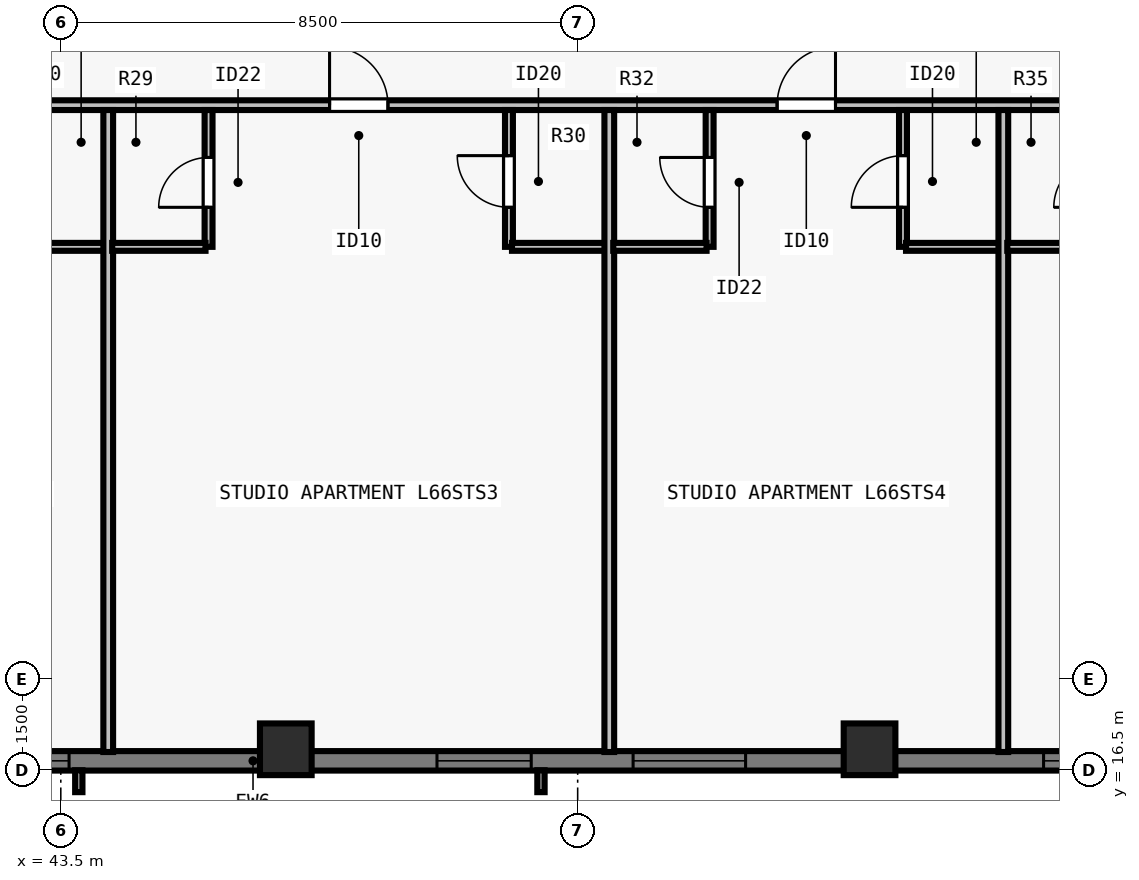
"""IFC4 building model, lengths in metres.
Left out: names, types, materials, properties, quantities, classifications, styles, units other than length and angle.
Written with IfcOpenShell. Run it as: python <this file> out.ifc"""

import sys

from ifc_helpers import new_model, si_unit, direction, frame, frame_2d, origin, origin_2d, place, context, subcontext, project, spatial, rectangle, extrude, element, fill, save


model = new_model("IFC4")
c1 = context("Model", 3, precision=1e-05, world=origin(), true_north=direction((0.0, 1.0)))
c2 = subcontext(c1, "Body", "Model", "MODEL_VIEW")
j1 = project(units=[si_unit("LENGTHUNIT", "METRE"), si_unit("PLANEANGLEUNIT", "RADIAN")], contexts=[c1])
p1 = place(None, origin())
s1 = spatial("IfcSite", under=j1, at=p1, CompositionType="ELEMENT")
p2 = place(p1, origin())
s2 = spatial("IfcBuilding", under=s1, at=p2, CompositionType="ELEMENT")
p3 = place(p2, frame((0.0, 0.0, 241.0)))
s3 = spatial("IfcBuildingStorey", under=s2, at=p3, CompositionType="ELEMENT", Elevation=241.0)
for number, where, z_axis, x_axis in (
    (1, (47.2, 16.85, 0.0), (0.0, 0.0, 1.0), (1.0, 0.0, 0.0)),
    (2, (56.8, 16.85, 0.0), (0.0, 0.0, 1.0), (1.0, 0.0, 0.0)),
):
    element("IfcColumn", number, at=place(p3, frame(where, z_axis=z_axis, x_axis=x_axis)), inside=s3, PredefinedType="COLUMN", context=c2, shape_type="SweptSolid", body=[
        extrude(rectangle(XDim=0.85, YDim=0.85, at=origin_2d()), origin(), (0.0, 0.0, 1.0), 3.5),
    ])
p4 = place(p3, frame((69.5, 16.66, 0.0), z_axis=(0.0, 0.0, 1.0), x_axis=(-1.0, 0.0, 0.0)))
e3 = element("IfcWall", 3, at=p4, inside=s3, PredefinedType="SOLIDWALL", context=c2, shape_type="SweptSolid", body=[
    extrude(rectangle(XDim=34.702, YDim=0.32, at=frame_2d((17.351, 0.0))), origin(), (0.0, 0.0, 1.0), 3.29),
])
p5 = place(p4, frame((4.763, 0.0, 0.8)))
e4 = element("IfcOpeningElement", 4, at=p5, cuts=e3, PredefinedType="OPENING", context=c2, shape_type="SweptSolid", body=[
    extrude(rectangle(XDim=1.55, YDim=1.678, at=frame_2d((0.775, 0.839))), frame((0.0, 0.17, 0.0), z_axis=(0.0, -1.0, 0.0), x_axis=(1.0, 0.0, 0.0)), (0.0, 0.0, 1.0), 0.34),
])
p6 = place(p4, frame((7.988, 0.0, 0.8)))
e5 = element("IfcOpeningElement", 5, at=p6, cuts=e3, PredefinedType="OPENING", context=c2, shape_type="SweptSolid", body=[
    extrude(rectangle(XDim=1.85, YDim=1.678, at=frame_2d((0.925, 0.839))), frame((0.0, 0.17, 0.0), z_axis=(0.0, -1.0, 0.0), x_axis=(1.0, 0.0, 0.0)), (0.0, 0.0, 1.0), 0.34),
])
p7 = place(p4, frame((14.738, 0.0, 0.8)))
e6 = element("IfcOpeningElement", 6, at=p7, cuts=e3, PredefinedType="OPENING", context=c2, shape_type="SweptSolid", body=[
    extrude(rectangle(XDim=1.85, YDim=1.678, at=frame_2d((0.925, 0.839))), frame((0.0, 0.17, 0.0), z_axis=(0.0, -1.0, 0.0), x_axis=(1.0, 0.0, 0.0)), (0.0, 0.0, 1.0), 0.34),
])
p8 = place(p4, frame((18.264, 0.0, 0.8)))
e7 = element("IfcOpeningElement", 7, at=p8, cuts=e3, PredefinedType="OPENING", context=c2, shape_type="SweptSolid", body=[
    extrude(rectangle(XDim=1.55, YDim=1.678, at=frame_2d((0.775, 0.839))), frame((0.0, 0.17, 0.0), z_axis=(0.0, -1.0, 0.0), x_axis=(1.0, 0.0, 0.0)), (0.0, 0.0, 1.0), 0.34),
])
p9 = place(p4, frame((25.864, 0.0, 0.8)))
e8 = element("IfcOpeningElement", 8, at=p9, cuts=e3, PredefinedType="OPENING", context=c2, shape_type="SweptSolid", body=[
    extrude(rectangle(XDim=1.55, YDim=1.678, at=frame_2d((0.775, 0.839))), frame((0.0, 0.17, 0.0), z_axis=(0.0, -1.0, 0.0), x_axis=(1.0, 0.0, 0.0)), (0.0, 0.0, 1.0), 0.34),
])
p10 = place(p4, frame((28.24, 0.0, 0.8)))
e9 = element("IfcOpeningElement", 9, at=p10, cuts=e3, PredefinedType="OPENING", context=c2, shape_type="SweptSolid", body=[
    extrude(rectangle(XDim=1.85, YDim=1.678, at=frame_2d((0.925, 0.839))), frame((0.0, 0.17, 0.0), z_axis=(0.0, -1.0, 0.0), x_axis=(1.0, 0.0, 0.0)), (0.0, 0.0, 1.0), 0.34),
])
p11 = place(p3, frame((29.805, 27.442, 0.0), z_axis=(0.0, 0.0, 1.0), x_axis=(1.0, 0.0, 0.0)))
e10 = element("IfcWall", 10, at=p11, inside=s3, PredefinedType="PARTITIONING", context=c2, shape_type="SweptSolid", body=[
    extrude(rectangle(XDim=44.39, YDim=0.16, at=frame_2d((22.195, 0.0))), origin(), (0.0, 0.0, 1.0), 2.958),
])
p12 = place(p11, frame((3.575, 0.0, 0.0)))
e11 = element("IfcOpeningElement", 11, at=p12, cuts=e10, PredefinedType="OPENING", context=c2, shape_type="SweptSolid", body=[
    extrude(rectangle(XDim=0.96, YDim=2.18, at=frame_2d((0.48, 1.09))), frame((0.0, 0.09, 0.0), z_axis=(0.0, -1.0, 0.0), x_axis=(1.0, 0.0, 0.0)), (0.0, 0.0, 1.0), 0.18),
])
p13 = place(p11, frame((10.755, 0.0, 0.0)))
e12 = element("IfcOpeningElement", 12, at=p13, cuts=e10, PredefinedType="OPENING", context=c2, shape_type="SweptSolid", body=[
    extrude(rectangle(XDim=0.96, YDim=2.18, at=frame_2d((0.48, 1.09))), frame((0.0, 0.09, 0.0), z_axis=(0.0, -1.0, 0.0), x_axis=(1.0, 0.0, 0.0)), (0.0, 0.0, 1.0), 0.18),
])
p14 = place(p11, frame((18.115, 0.0, 0.0)))
e13 = element("IfcOpeningElement", 13, at=p14, cuts=e10, PredefinedType="OPENING", context=c2, shape_type="SweptSolid", body=[
    extrude(rectangle(XDim=0.96, YDim=2.18, at=frame_2d((0.48, 1.09))), frame((0.0, 0.09, 0.0), z_axis=(0.0, -1.0, 0.0), x_axis=(1.0, 0.0, 0.0)), (0.0, 0.0, 1.0), 0.18),
])
p15 = place(p11, frame((25.475, 0.0, 0.0)))
e14 = element("IfcOpeningElement", 14, at=p15, cuts=e10, PredefinedType="OPENING", context=c2, shape_type="SweptSolid", body=[
    extrude(rectangle(XDim=0.96, YDim=2.18, at=frame_2d((0.48, 1.09))), frame((0.0, 0.09, 0.0), z_axis=(0.0, -1.0, 0.0), x_axis=(1.0, 0.0, 0.0)), (0.0, 0.0, 1.0), 0.18),
])
p16 = place(p11, frame((32.835, 0.0, 0.0)))
e15 = element("IfcOpeningElement", 15, at=p16, cuts=e10, PredefinedType="OPENING", context=c2, shape_type="SweptSolid", body=[
    extrude(rectangle(XDim=0.96, YDim=2.18, at=frame_2d((0.48, 1.09))), frame((0.0, 0.09, 0.0), z_axis=(0.0, -1.0, 0.0), x_axis=(1.0, 0.0, 0.0)), (0.0, 0.0, 1.0), 0.18),
])
p17 = place(p11, frame((40.375, 0.0, 0.0)))
e16 = element("IfcOpeningElement", 16, at=p17, cuts=e10, PredefinedType="OPENING", context=c2, shape_type="SweptSolid", body=[
    extrude(rectangle(XDim=0.96, YDim=2.18, at=frame_2d((0.48, 1.09))), frame((0.0, 0.09, 0.0), z_axis=(0.0, -1.0, 0.0), x_axis=(1.0, 0.0, 0.0)), (0.0, 0.0, 1.0), 0.18),
])
p18 = place(p3, frame((42.68, 25.113, 0.0), z_axis=(0.0, 0.0, 1.0), x_axis=(1.0, 0.0, 0.0)))
e17 = element("IfcWall", 17, at=p18, inside=s3, PredefinedType="PLUMBINGWALL", context=c2, shape_type="SweptSolid", body=[
    extrude(rectangle(XDim=1.6, YDim=0.13, at=frame_2d((0.8, 0.0))), origin(), (0.0, 0.0, 1.0), 3.29),
])
p19 = place(p3, frame((44.28, 16.805, 0.0), z_axis=(0.0, 0.0, 1.0), x_axis=(0.0, 1.0, 0.0)))
e18 = element("IfcWall", 18, at=p19, inside=s3, PredefinedType="PARTITIONING", context=c2, shape_type="SweptSolid", body=[
    extrude(rectangle(XDim=10.558, YDim=0.16, at=frame_2d((5.279, 0.0))), origin(), (0.0, 0.0, 1.0), 3.29),
])
p20 = place(p3, frame((45.93, 25.113, 0.0), z_axis=(0.0, 0.0, 1.0), x_axis=(0.0, 1.0, 0.0)))
e19 = element("IfcWall", 19, at=p20, inside=s3, PredefinedType="PLUMBINGWALL", context=c2, shape_type="SweptSolid", body=[
    extrude(rectangle(XDim=2.25, YDim=0.13, at=frame_2d((1.125, 0.0))), origin(), (0.0, 0.0, 1.0), 3.29),
])
p21 = place(p20, frame((0.65, 0.0, 0.0)))
e20 = element("IfcOpeningElement", 20, at=p21, cuts=e19, PredefinedType="OPENING", context=c2, shape_type="SweptSolid", body=[
    extrude(rectangle(XDim=0.82, YDim=2.1, at=frame_2d((0.41, 1.05))), frame((0.0, 0.075, 0.0), z_axis=(0.0, -1.0, 0.0), x_axis=(1.0, 0.0, 0.0)), (0.0, 0.0, 1.0), 0.15),
])
p22 = place(p3, frame((44.345, 25.113, 0.0), z_axis=(0.0, 0.0, 1.0), x_axis=(1.0, 0.0, 0.0)))
e21 = element("IfcWall", 21, at=p22, inside=s3, PredefinedType="PLUMBINGWALL", context=c2, shape_type="SweptSolid", body=[
    extrude(rectangle(XDim=1.535, YDim=0.13, at=frame_2d((0.768, 0.0))), origin(), (0.0, 0.0, 1.0), 3.29),
])
p23 = place(p3, frame((50.87, 25.113, 0.0), z_axis=(0.0, 0.0, 1.0), x_axis=(0.0, 1.0, 0.0)))
e22 = element("IfcWall", 22, at=p23, inside=s3, PredefinedType="PLUMBINGWALL", context=c2, shape_type="SweptSolid", body=[
    extrude(rectangle(XDim=2.25, YDim=0.13, at=frame_2d((1.125, 0.0))), origin(), (0.0, 0.0, 1.0), 3.29),
])
p24 = place(p23, frame((0.65, 0.0, 0.0)))
e23 = element("IfcOpeningElement", 23, at=p24, cuts=e22, PredefinedType="OPENING", context=c2, shape_type="SweptSolid", body=[
    extrude(rectangle(XDim=0.85, YDim=2.1, at=frame_2d((0.425, 1.05))), frame((0.0, 0.075, 0.0), z_axis=(0.0, -1.0, 0.0), x_axis=(1.0, 0.0, 0.0)), (0.0, 0.0, 1.0), 0.15),
])
p25 = place(p3, frame((50.92, 25.113, 0.0), z_axis=(0.0, 0.0, 1.0), x_axis=(1.0, 0.0, 0.0)))
e24 = element("IfcWall", 24, at=p25, inside=s3, PredefinedType="PLUMBINGWALL", context=c2, shape_type="SweptSolid", body=[
    extrude(rectangle(XDim=1.6, YDim=0.13, at=frame_2d((0.8, 0.0))), origin(), (0.0, 0.0, 1.0), 3.29),
])
p26 = place(p3, frame((52.52, 16.805, 0.0), z_axis=(0.0, 0.0, 1.0), x_axis=(0.0, 1.0, 0.0)))
e25 = element("IfcWall", 25, at=p26, inside=s3, PredefinedType="PARTITIONING", context=c2, shape_type="SweptSolid", body=[
    extrude(rectangle(XDim=10.558, YDim=0.16, at=frame_2d((5.279, 0.0))), origin(), (0.0, 0.0, 1.0), 2.958),
])
p27 = place(p3, frame((54.17, 25.113, 0.0), z_axis=(0.0, 0.0, 1.0), x_axis=(0.0, 1.0, 0.0)))
e26 = element("IfcWall", 26, at=p27, inside=s3, PredefinedType="PLUMBINGWALL", context=c2, shape_type="SweptSolid", body=[
    extrude(rectangle(XDim=2.25, YDim=0.13, at=frame_2d((1.125, 0.0))), origin(), (0.0, 0.0, 1.0), 2.958),
])
p28 = place(p27, frame((0.65, 0.0, 0.0)))
e27 = element("IfcOpeningElement", 27, at=p28, cuts=e26, PredefinedType="OPENING", context=c2, shape_type="SweptSolid", body=[
    extrude(rectangle(XDim=0.82, YDim=2.1, at=frame_2d((0.41, 1.05))), frame((0.0, 0.075, 0.0), z_axis=(0.0, -1.0, 0.0), x_axis=(1.0, 0.0, 0.0)), (0.0, 0.0, 1.0), 0.15),
])
p29 = place(p3, frame((52.585, 25.113, 0.0), z_axis=(0.0, 0.0, 1.0), x_axis=(1.0, 0.0, 0.0)))
e28 = element("IfcWall", 28, at=p29, inside=s3, PredefinedType="PLUMBINGWALL", context=c2, shape_type="SweptSolid", body=[
    extrude(rectangle(XDim=1.535, YDim=0.13, at=frame_2d((0.768, 0.0))), origin(), (0.0, 0.0, 1.0), 3.29),
])
p30 = place(p3, frame((57.35, 25.113, 0.0), z_axis=(0.0, 0.0, 1.0), x_axis=(0.0, 1.0, 0.0)))
e29 = element("IfcWall", 29, at=p30, inside=s3, PredefinedType="PLUMBINGWALL", context=c2, shape_type="SweptSolid", body=[
    extrude(rectangle(XDim=2.25, YDim=0.13, at=frame_2d((1.125, 0.0))), origin(), (0.0, 0.0, 1.0), 3.29),
])
p31 = place(p30, frame((0.65, 0.0, 0.0)))
e30 = element("IfcOpeningElement", 30, at=p31, cuts=e29, PredefinedType="OPENING", context=c2, shape_type="SweptSolid", body=[
    extrude(rectangle(XDim=0.85, YDim=2.1, at=frame_2d((0.425, 1.05))), frame((0.0, 0.075, 0.0), z_axis=(0.0, -1.0, 0.0), x_axis=(1.0, 0.0, 0.0)), (0.0, 0.0, 1.0), 0.15),
])
p32 = place(p3, frame((57.4, 25.113, 0.0), z_axis=(0.0, 0.0, 1.0), x_axis=(1.0, 0.0, 0.0)))
e31 = element("IfcWall", 31, at=p32, inside=s3, PredefinedType="PLUMBINGWALL", context=c2, shape_type="SweptSolid", body=[
    extrude(rectangle(XDim=1.6, YDim=0.13, at=frame_2d((0.8, 0.0))), origin(), (0.0, 0.0, 1.0), 3.29),
])
p33 = place(p3, frame((59.0, 16.805, 0.0), z_axis=(0.0, 0.0, 1.0), x_axis=(0.0, 1.0, 0.0)))
e32 = element("IfcWall", 32, at=p33, inside=s3, PredefinedType="PARTITIONING", context=c2, shape_type="SweptSolid", body=[
    extrude(rectangle(XDim=10.558, YDim=0.16, at=frame_2d((5.279, 0.0))), origin(), (0.0, 0.0, 1.0), 3.29),
])
p34 = place(p3, frame((59.065, 25.113, 0.0), z_axis=(0.0, 0.0, 1.0), x_axis=(1.0, 0.0, 0.0)))
e33 = element("IfcWall", 33, at=p34, inside=s3, PredefinedType="PLUMBINGWALL", context=c2, shape_type="SweptSolid", body=[
    extrude(rectangle(XDim=1.535, YDim=0.13, at=frame_2d((0.768, 0.0))), origin(), (0.0, 0.0, 1.0), 3.29),
])
p35 = place(p6, origin())
e34 = element("IfcWindow", 34, at=p35, inside=s3, PartitioningType="SINGLE_PANEL", PredefinedType="WINDOW", context=c2, shape_type="SweptSolid", body=[
    extrude(rectangle(XDim=1.85, YDim=1.678, at=frame_2d((0.925, 0.839))), frame((0.0, -0.05, 0.0), z_axis=(0.0, -1.0, 0.0), x_axis=(1.0, 0.0, 0.0)), (0.0, 0.0, 1.0), 0.06),
])
fill(e5, e34)
p36 = place(p7, origin())
e35 = element("IfcWindow", 35, at=p36, inside=s3, PartitioningType="SINGLE_PANEL", PredefinedType="WINDOW", context=c2, shape_type="SweptSolid", body=[
    extrude(rectangle(XDim=1.85, YDim=1.678, at=frame_2d((0.925, 0.839))), frame((0.0, -0.05, 0.0), z_axis=(0.0, -1.0, 0.0), x_axis=(1.0, 0.0, 0.0)), (0.0, 0.0, 1.0), 0.06),
])
fill(e6, e35)
p37 = place(p8, origin())
e36 = element("IfcWindow", 36, at=p37, inside=s3, PartitioningType="SINGLE_PANEL", PredefinedType="WINDOW", context=c2, shape_type="SweptSolid", body=[
    extrude(rectangle(XDim=1.55, YDim=1.678, at=frame_2d((0.775, 0.839))), frame((0.0, -0.05, 0.0), z_axis=(0.0, -1.0, 0.0), x_axis=(1.0, 0.0, 0.0)), (0.0, 0.0, 1.0), 0.06),
])
fill(e7, e36)
p38 = place(p9, origin())
e37 = element("IfcWindow", 37, at=p38, inside=s3, PartitioningType="SINGLE_PANEL", PredefinedType="WINDOW", context=c2, shape_type="SweptSolid", body=[
    extrude(rectangle(XDim=1.55, YDim=1.678, at=frame_2d((0.775, 0.839))), frame((0.0, -0.05, 0.0), z_axis=(0.0, -1.0, 0.0), x_axis=(1.0, 0.0, 0.0)), (0.0, 0.0, 1.0), 0.06),
])
fill(e8, e37)
p39 = place(p21, origin())
e38 = element("IfcDoor", 38, at=p39, inside=s3, OperationType="SINGLE_SWING_LEFT", PredefinedType="DOOR", context=c2, shape_type="SweptSolid", body=[
    extrude(rectangle(XDim=0.82, YDim=2.1, at=frame_2d((0.41, 1.05))), frame((0.0, 0.025, 0.0), z_axis=(0.0, -1.0, 0.0), x_axis=(1.0, 0.0, 0.0)), (0.0, 0.0, 1.0), 0.05),
])
fill(e20, e38)
p40 = place(p24, origin())
e39 = element("IfcDoor", 39, at=p40, inside=s3, OperationType="SINGLE_SWING_RIGHT", PredefinedType="DOOR", context=c2, shape_type="SweptSolid", body=[
    extrude(rectangle(XDim=0.85, YDim=2.1, at=frame_2d((0.425, 1.05))), frame((0.0, 0.025, 0.0), z_axis=(0.0, -1.0, 0.0), x_axis=(1.0, 0.0, 0.0)), (0.0, 0.0, 1.0), 0.05),
])
fill(e23, e39)
p41 = place(p14, origin())
e40 = element("IfcDoor", 40, at=p41, inside=s3, OperationType="SINGLE_SWING_LEFT", PredefinedType="DOOR", context=c2, shape_type="SweptSolid", body=[
    extrude(rectangle(XDim=0.96, YDim=2.18, at=frame_2d((0.48, 1.09))), frame((0.0, 0.025, 0.0), z_axis=(0.0, -1.0, 0.0), x_axis=(1.0, 0.0, 0.0)), (0.0, 0.0, 1.0), 0.05),
])
fill(e13, e40)
p42 = place(p28, origin())
e41 = element("IfcDoor", 41, at=p42, inside=s3, OperationType="SINGLE_SWING_RIGHT", PredefinedType="DOOR", context=c2, shape_type="SweptSolid", body=[
    extrude(rectangle(XDim=0.82, YDim=2.1, at=frame_2d((0.41, 1.05))), frame((0.0, 0.025, 0.0), z_axis=(0.0, -1.0, 0.0), x_axis=(1.0, 0.0, 0.0)), (0.0, 0.0, 1.0), 0.05),
])
fill(e27, e41)
p43 = place(p31, origin())
e42 = element("IfcDoor", 42, at=p43, inside=s3, OperationType="SINGLE_SWING_LEFT", PredefinedType="DOOR", context=c2, shape_type="SweptSolid", body=[
    extrude(rectangle(XDim=0.85, YDim=2.1, at=frame_2d((0.425, 1.05))), frame((0.0, 0.025, 0.0), z_axis=(0.0, -1.0, 0.0), x_axis=(1.0, 0.0, 0.0)), (0.0, 0.0, 1.0), 0.05),
])
fill(e30, e42)
p44 = place(p15, origin())
e43 = element("IfcDoor", 43, at=p44, inside=s3, OperationType="SINGLE_SWING_RIGHT", PredefinedType="DOOR", context=c2, shape_type="SweptSolid", body=[
    extrude(rectangle(XDim=0.96, YDim=2.18, at=frame_2d((0.48, 1.09))), frame((0.0, 0.025, 0.0), z_axis=(0.0, -1.0, 0.0), x_axis=(1.0, 0.0, 0.0)), (0.0, 0.0, 1.0), 0.05),
])
fill(e14, e43)
save(model, sys.argv[1])
